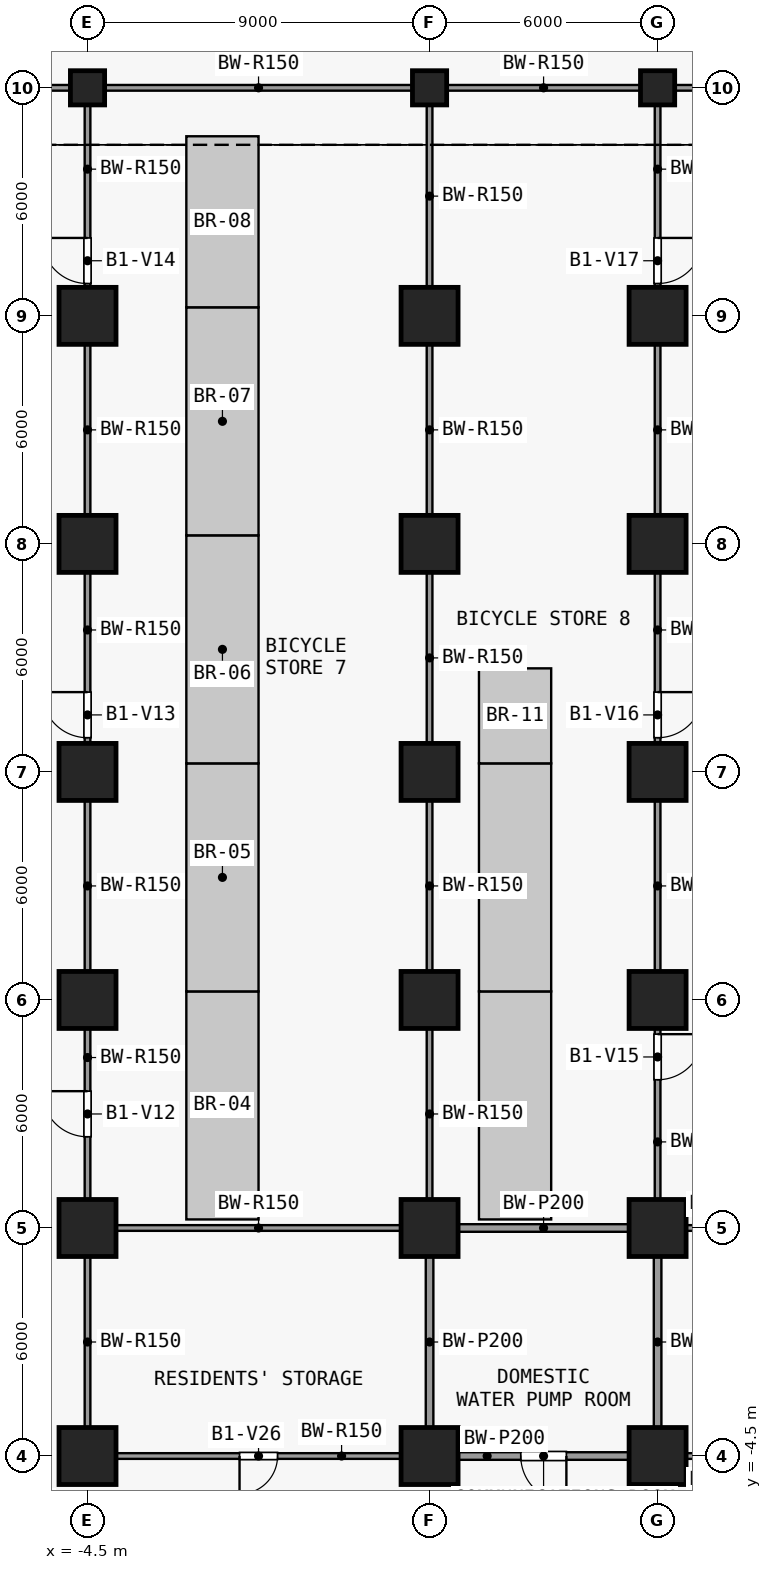
"""IFC4 building model, lengths in metres.
Left out: names, types, materials, properties, quantities, classifications, styles, units other than length and angle.
Written with IfcOpenShell. Run it as: python <this file> out.ifc"""

import sys

from ifc_helpers import new_model, si_unit, direction, frame, frame_2d, origin, origin_2d, place, context, subcontext, project, spatial, rectangle, extrude, element, fill, save


model = new_model("IFC4")
c1 = context("Model", 3, precision=1e-05, world=origin(), true_north=direction((0.0, 1.0)))
c2 = subcontext(c1, "Body", "Model", "MODEL_VIEW")
j1 = project(units=[si_unit("LENGTHUNIT", "METRE"), si_unit("PLANEANGLEUNIT", "RADIAN")], contexts=[c1])
p1 = place(None, origin())
s1 = spatial("IfcSite", under=j1, at=p1, CompositionType="ELEMENT")
p2 = place(p1, origin())
s2 = spatial("IfcBuilding", under=s1, at=p2, CompositionType="ELEMENT")
p3 = place(p2, frame((0.0, 0.0, -5.0)))
s3 = spatial("IfcBuildingStorey", under=s2, at=p3, CompositionType="ELEMENT", Elevation=-5.0)
for number, where, z_axis, x_axis in (
    (1, (-4.5, -4.5, 0.0), (0.0, 0.0, 1.0), (1.0, 0.0, 0.0)),
    (2, (-4.5, 1.5, 0.0), (0.0, 0.0, 1.0), (1.0, 0.0, 0.0)),
    (3, (-4.5, 7.5, 0.0), (0.0, 0.0, 1.0), (1.0, 0.0, 0.0)),
    (4, (-4.5, 13.5, 0.0), (0.0, 0.0, 1.0), (1.0, 0.0, 0.0)),
    (5, (-4.5, 19.5, 0.0), (0.0, 0.0, 1.0), (1.0, 0.0, 0.0)),
    (6, (-4.5, 25.5, 0.0), (0.0, 0.0, 1.0), (1.0, 0.0, 0.0)),
):
    element("IfcColumn", number, at=place(p3, frame(where, z_axis=z_axis, x_axis=x_axis)), inside=s3, PredefinedType="COLUMN", context=c2, shape_type="SweptSolid", body=[
        extrude(rectangle(XDim=1.5, YDim=1.5, at=origin_2d()), origin(), (0.0, 0.0, 1.0), 5.0),
    ])
p4 = place(p3, frame((-4.5, 31.5, 0.0), z_axis=(0.0, 0.0, 1.0), x_axis=(1.0, 0.0, 0.0)))
e7 = element("IfcColumn", 7, at=p4, inside=s3, PredefinedType="COLUMN", context=c2, shape_type="SweptSolid", body=[
    extrude(rectangle(XDim=0.9, YDim=0.9, at=origin_2d()), origin(), (0.0, 0.0, 1.0), 5.0),
])
for number, where, z_axis, x_axis in (
    (8, (4.5, -4.5, 0.0), (0.0, 0.0, 1.0), (1.0, 0.0, 0.0)),
    (9, (4.5, 1.5, 0.0), (0.0, 0.0, 1.0), (1.0, 0.0, 0.0)),
    (10, (4.5, 7.5, 0.0), (0.0, 0.0, 1.0), (1.0, 0.0, 0.0)),
    (11, (4.5, 13.5, 0.0), (0.0, 0.0, 1.0), (1.0, 0.0, 0.0)),
    (12, (4.5, 19.5, 0.0), (0.0, 0.0, 1.0), (1.0, 0.0, 0.0)),
    (13, (4.5, 25.5, 0.0), (0.0, 0.0, 1.0), (1.0, 0.0, 0.0)),
):
    element("IfcColumn", number, at=place(p3, frame(where, z_axis=z_axis, x_axis=x_axis)), inside=s3, PredefinedType="COLUMN", context=c2, shape_type="SweptSolid", body=[
        extrude(rectangle(XDim=1.5, YDim=1.5, at=origin_2d()), origin(), (0.0, 0.0, 1.0), 5.0),
    ])
p5 = place(p3, frame((4.5, 31.5, 0.0), z_axis=(0.0, 0.0, 1.0), x_axis=(1.0, 0.0, 0.0)))
e14 = element("IfcColumn", 14, at=p5, inside=s3, PredefinedType="COLUMN", context=c2, shape_type="SweptSolid", body=[
    extrude(rectangle(XDim=0.9, YDim=0.9, at=origin_2d()), origin(), (0.0, 0.0, 1.0), 5.0),
])
for number, where, z_axis, x_axis in (
    (15, (10.5, -4.5, 0.0), (0.0, 0.0, 1.0), (1.0, 0.0, 0.0)),
    (16, (10.5, 1.5, 0.0), (0.0, 0.0, 1.0), (1.0, 0.0, 0.0)),
    (17, (10.5, 7.5, 0.0), (0.0, 0.0, 1.0), (1.0, 0.0, 0.0)),
    (18, (10.5, 13.5, 0.0), (0.0, 0.0, 1.0), (1.0, 0.0, 0.0)),
    (19, (10.5, 19.5, 0.0), (0.0, 0.0, 1.0), (1.0, 0.0, 0.0)),
    (20, (10.5, 25.5, 0.0), (0.0, 0.0, 1.0), (1.0, 0.0, 0.0)),
):
    element("IfcColumn", number, at=place(p3, frame(where, z_axis=z_axis, x_axis=x_axis)), inside=s3, PredefinedType="COLUMN", context=c2, shape_type="SweptSolid", body=[
        extrude(rectangle(XDim=1.5, YDim=1.5, at=origin_2d()), origin(), (0.0, 0.0, 1.0), 5.0),
    ])
p6 = place(p3, frame((10.5, 31.5, 0.0), z_axis=(0.0, 0.0, 1.0), x_axis=(1.0, 0.0, 0.0)))
e21 = element("IfcColumn", 21, at=p6, inside=s3, PredefinedType="COLUMN", context=c2, shape_type="SweptSolid", body=[
    extrude(rectangle(XDim=0.9, YDim=0.9, at=origin_2d()), origin(), (0.0, 0.0, 1.0), 5.0),
])
p7 = place(p3, frame((3.75, -4.5, 0.0), z_axis=(0.0, 0.0, 1.0), x_axis=(-1.0, 0.0, 0.0)))
e22 = element("IfcWall", 22, at=p7, inside=s3, PredefinedType="PARTITIONING", context=c2, shape_type="SweptSolid", body=[
    extrude(rectangle(XDim=7.5, YDim=0.15, at=frame_2d((3.75, 0.0))), origin(), (0.0, 0.0, 1.0), 4.55),
])
p8 = place(p7, frame((3.25, 0.0, 0.0)))
e23 = element("IfcOpeningElement", 23, at=p8, cuts=e22, PredefinedType="OPENING", context=c2, shape_type="SweptSolid", body=[
    extrude(rectangle(XDim=1.0, YDim=2.1, at=frame_2d((0.5, 1.05))), frame((0.0, 0.085, 0.0), z_axis=(0.0, -1.0, 0.0), x_axis=(1.0, 0.0, 0.0)), (0.0, 0.0, 1.0), 0.17),
])
p9 = place(p3, frame((9.75, -4.5, 0.0), z_axis=(0.0, 0.0, 1.0), x_axis=(-1.0, 0.0, 0.0)))
e24 = element("IfcWall", 24, at=p9, inside=s3, PredefinedType="SOLIDWALL", context=c2, shape_type="SweptSolid", body=[
    extrude(rectangle(XDim=4.5, YDim=0.2, at=frame_2d((2.25, 0.0))), origin(), (0.0, 0.0, 1.0), 4.55),
])
p10 = place(p9, frame((1.65, 0.0, 0.0)))
e25 = element("IfcOpeningElement", 25, at=p10, cuts=e24, PredefinedType="OPENING", context=c2, shape_type="SweptSolid", body=[
    extrude(rectangle(XDim=1.2, YDim=2.1, at=frame_2d((0.6, 1.05))), frame((0.0, 0.11, 0.0), z_axis=(0.0, -1.0, 0.0), x_axis=(1.0, 0.0, 0.0)), (0.0, 0.0, 1.0), 0.22),
])
p11 = place(p3, frame((11.25, -4.5, 0.0), z_axis=(0.0, 0.0, 1.0), x_axis=(1.0, 0.0, 0.0)))
e26 = element("IfcWall", 26, at=p11, inside=s3, PredefinedType="PARTITIONING", context=c2, shape_type="SweptSolid", body=[
    extrude(rectangle(XDim=2.325, YDim=0.15, at=frame_2d((1.163, 0.0))), origin(), (0.0, 0.0, 1.0), 4.55),
])
p12 = place(p3, frame((-3.75, 1.5, 0.0), z_axis=(0.0, 0.0, 1.0), x_axis=(1.0, 0.0, 0.0)))
e27 = element("IfcWall", 27, at=p12, inside=s3, PredefinedType="PARTITIONING", context=c2, shape_type="SweptSolid", body=[
    extrude(rectangle(XDim=7.5, YDim=0.15, at=frame_2d((3.75, 0.0))), origin(), (0.0, 0.0, 1.0), 4.55),
])
p13 = place(p3, frame((5.25, 1.5, 0.0), z_axis=(0.0, 0.0, 1.0), x_axis=(1.0, 0.0, 0.0)))
e28 = element("IfcWall", 28, at=p13, inside=s3, PredefinedType="SOLIDWALL", context=c2, shape_type="SweptSolid", body=[
    extrude(rectangle(XDim=4.5, YDim=0.2, at=frame_2d((2.25, 0.0))), origin(), (0.0, 0.0, 1.0), 4.55),
])
p14 = place(p3, frame((11.25, 1.5, 0.0), z_axis=(0.0, 0.0, 1.0), x_axis=(1.0, 0.0, 0.0)))
e29 = element("IfcWall", 29, at=p14, inside=s3, PredefinedType="PARTITIONING", context=c2, shape_type="SweptSolid", body=[
    extrude(rectangle(XDim=2.325, YDim=0.15, at=frame_2d((1.163, 0.0))), origin(), (0.0, 0.0, 1.0), 4.55),
])
p15 = place(p3, frame((-10.05, 31.5, 0.0), z_axis=(0.0, 0.0, 1.0), x_axis=(1.0, 0.0, 0.0)))
e30 = element("IfcWall", 30, at=p15, inside=s3, PredefinedType="PARTITIONING", context=c2, shape_type="SweptSolid", body=[
    extrude(rectangle(XDim=5.1, YDim=0.15, at=frame_2d((2.55, 0.0))), origin(), (0.0, 0.0, 1.0), 4.55),
])
p16 = place(p3, frame((-4.05, 31.5, 0.0), z_axis=(0.0, 0.0, 1.0), x_axis=(1.0, 0.0, 0.0)))
e31 = element("IfcWall", 31, at=p16, inside=s3, PredefinedType="PARTITIONING", context=c2, shape_type="SweptSolid", body=[
    extrude(rectangle(XDim=8.1, YDim=0.15, at=frame_2d((4.05, 0.0))), origin(), (0.0, 0.0, 1.0), 4.55),
])
for number, where, z_axis, x_axis in (
    (32, (4.95, 31.5, 0.0), (0.0, 0.0, 1.0), (1.0, 0.0, 0.0)),
    (33, (10.95, 31.5, 0.0), (0.0, 0.0, 1.0), (1.0, 0.0, 0.0)),
):
    element("IfcWall", number, at=place(p3, frame(where, z_axis=z_axis, x_axis=x_axis)), inside=s3, PredefinedType="PARTITIONING", context=c2, shape_type="SweptSolid", body=[
        extrude(rectangle(XDim=5.1, YDim=0.15, at=frame_2d((2.55, 0.0))), origin(), (0.0, 0.0, 1.0), 4.55),
    ])
p17 = place(p3, frame((-4.5, -3.75, 0.0), z_axis=(0.0, 0.0, 1.0), x_axis=(0.0, 1.0, 0.0)))
e34 = element("IfcWall", 34, at=p17, inside=s3, PredefinedType="PARTITIONING", context=c2, shape_type="SweptSolid", body=[
    extrude(rectangle(XDim=4.5, YDim=0.15, at=frame_2d((2.25, 0.0))), origin(), (0.0, 0.0, 1.0), 4.55),
])
p18 = place(p3, frame((-4.5, 2.25, 0.0), z_axis=(0.0, 0.0, 1.0), x_axis=(0.0, 1.0, 0.0)))
e35 = element("IfcWall", 35, at=p18, inside=s3, PredefinedType="PARTITIONING", context=c2, shape_type="SweptSolid", body=[
    extrude(rectangle(XDim=4.5, YDim=0.15, at=frame_2d((2.25, 0.0))), origin(), (0.0, 0.0, 1.0), 4.55),
])
p19 = place(p18, frame((1.65, 0.0, 0.0)))
e36 = element("IfcOpeningElement", 36, at=p19, cuts=e35, PredefinedType="OPENING", context=c2, shape_type="SweptSolid", body=[
    extrude(rectangle(XDim=1.2, YDim=2.1, at=frame_2d((0.6, 1.05))), frame((0.0, 0.085, 0.0), z_axis=(0.0, -1.0, 0.0), x_axis=(1.0, 0.0, 0.0)), (0.0, 0.0, 1.0), 0.17),
])
p20 = place(p3, frame((-4.5, 8.25, 0.0), z_axis=(0.0, 0.0, 1.0), x_axis=(0.0, 1.0, 0.0)))
e37 = element("IfcWall", 37, at=p20, inside=s3, PredefinedType="PARTITIONING", context=c2, shape_type="SweptSolid", body=[
    extrude(rectangle(XDim=4.5, YDim=0.15, at=frame_2d((2.25, 0.0))), origin(), (0.0, 0.0, 1.0), 4.55),
])
p21 = place(p3, frame((-4.5, 14.25, 0.0), z_axis=(0.0, 0.0, 1.0), x_axis=(0.0, 1.0, 0.0)))
e38 = element("IfcWall", 38, at=p21, inside=s3, PredefinedType="PARTITIONING", context=c2, shape_type="SweptSolid", body=[
    extrude(rectangle(XDim=4.5, YDim=0.15, at=frame_2d((2.25, 0.0))), origin(), (0.0, 0.0, 1.0), 4.55),
])
p22 = place(p21, frame((0.15, 0.0, 0.0)))
e39 = element("IfcOpeningElement", 39, at=p22, cuts=e38, PredefinedType="OPENING", context=c2, shape_type="SweptSolid", body=[
    extrude(rectangle(XDim=1.2, YDim=2.1, at=frame_2d((0.6, 1.05))), frame((0.0, 0.085, 0.0), z_axis=(0.0, -1.0, 0.0), x_axis=(1.0, 0.0, 0.0)), (0.0, 0.0, 1.0), 0.17),
])
p23 = place(p3, frame((-4.5, 20.25, 0.0), z_axis=(0.0, 0.0, 1.0), x_axis=(0.0, 1.0, 0.0)))
e40 = element("IfcWall", 40, at=p23, inside=s3, PredefinedType="PARTITIONING", context=c2, shape_type="SweptSolid", body=[
    extrude(rectangle(XDim=4.5, YDim=0.15, at=frame_2d((2.25, 0.0))), origin(), (0.0, 0.0, 1.0), 4.55),
])
p24 = place(p3, frame((-4.5, 26.25, 0.0), z_axis=(0.0, 0.0, 1.0), x_axis=(0.0, 1.0, 0.0)))
e41 = element("IfcWall", 41, at=p24, inside=s3, PredefinedType="PARTITIONING", context=c2, shape_type="SweptSolid", body=[
    extrude(rectangle(XDim=4.8, YDim=0.15, at=frame_2d((2.4, 0.0))), origin(), (0.0, 0.0, 1.0), 4.55),
])
p25 = place(p24, frame((0.1, 0.0, 0.0)))
e42 = element("IfcOpeningElement", 42, at=p25, cuts=e41, PredefinedType="OPENING", context=c2, shape_type="SweptSolid", body=[
    extrude(rectangle(XDim=1.2, YDim=2.1, at=frame_2d((0.6, 1.05))), frame((0.0, 0.085, 0.0), z_axis=(0.0, -1.0, 0.0), x_axis=(1.0, 0.0, 0.0)), (0.0, 0.0, 1.0), 0.17),
])
p26 = place(p3, frame((4.5, -3.75, 0.0), z_axis=(0.0, 0.0, 1.0), x_axis=(0.0, 1.0, 0.0)))
e43 = element("IfcWall", 43, at=p26, inside=s3, PredefinedType="SOLIDWALL", context=c2, shape_type="SweptSolid", body=[
    extrude(rectangle(XDim=4.5, YDim=0.2, at=frame_2d((2.25, 0.0))), origin(), (0.0, 0.0, 1.0), 4.55),
])
for number, where, z_axis, x_axis in (
    (44, (4.5, 2.25, 0.0), (0.0, 0.0, 1.0), (0.0, 1.0, 0.0)),
    (45, (4.5, 8.25, 0.0), (0.0, 0.0, 1.0), (0.0, 1.0, 0.0)),
    (46, (4.5, 14.25, 0.0), (0.0, 0.0, 1.0), (0.0, 1.0, 0.0)),
    (47, (4.5, 20.25, 0.0), (0.0, 0.0, 1.0), (0.0, 1.0, 0.0)),
):
    element("IfcWall", number, at=place(p3, frame(where, z_axis=z_axis, x_axis=x_axis)), inside=s3, PredefinedType="PARTITIONING", context=c2, shape_type="SweptSolid", body=[
        extrude(rectangle(XDim=4.5, YDim=0.15, at=frame_2d((2.25, 0.0))), origin(), (0.0, 0.0, 1.0), 4.55),
    ])
p27 = place(p3, frame((4.5, 26.25, 0.0), z_axis=(0.0, 0.0, 1.0), x_axis=(0.0, 1.0, 0.0)))
e48 = element("IfcWall", 48, at=p27, inside=s3, PredefinedType="PARTITIONING", context=c2, shape_type="SweptSolid", body=[
    extrude(rectangle(XDim=4.8, YDim=0.15, at=frame_2d((2.4, 0.0))), origin(), (0.0, 0.0, 1.0), 4.55),
])
p28 = place(p3, frame((10.5, -3.75, 0.0), z_axis=(0.0, 0.0, 1.0), x_axis=(0.0, 1.0, 0.0)))
e49 = element("IfcWall", 49, at=p28, inside=s3, PredefinedType="SOLIDWALL", context=c2, shape_type="SweptSolid", body=[
    extrude(rectangle(XDim=4.5, YDim=0.2, at=frame_2d((2.25, 0.0))), origin(), (0.0, 0.0, 1.0), 4.55),
])
p29 = place(p3, frame((10.5, 6.75, 0.0), z_axis=(0.0, 0.0, 1.0), x_axis=(0.0, -1.0, 0.0)))
e50 = element("IfcWall", 50, at=p29, inside=s3, PredefinedType="PARTITIONING", context=c2, shape_type="SweptSolid", body=[
    extrude(rectangle(XDim=4.5, YDim=0.15, at=frame_2d((2.25, 0.0))), origin(), (0.0, 0.0, 1.0), 4.55),
])
p30 = place(p29, frame((0.15, 0.0, 0.0)))
e51 = element("IfcOpeningElement", 51, at=p30, cuts=e50, PredefinedType="OPENING", context=c2, shape_type="SweptSolid", body=[
    extrude(rectangle(XDim=1.2, YDim=2.1, at=frame_2d((0.6, 1.05))), frame((0.0, 0.085, 0.0), z_axis=(0.0, -1.0, 0.0), x_axis=(1.0, 0.0, 0.0)), (0.0, 0.0, 1.0), 0.17),
])
p31 = place(p3, frame((10.5, 8.25, 0.0), z_axis=(0.0, 0.0, 1.0), x_axis=(0.0, 1.0, 0.0)))
e52 = element("IfcWall", 52, at=p31, inside=s3, PredefinedType="PARTITIONING", context=c2, shape_type="SweptSolid", body=[
    extrude(rectangle(XDim=4.5, YDim=0.15, at=frame_2d((2.25, 0.0))), origin(), (0.0, 0.0, 1.0), 4.55),
])
p32 = place(p3, frame((10.5, 18.75, 0.0), z_axis=(0.0, 0.0, 1.0), x_axis=(0.0, -1.0, 0.0)))
e53 = element("IfcWall", 53, at=p32, inside=s3, PredefinedType="PARTITIONING", context=c2, shape_type="SweptSolid", body=[
    extrude(rectangle(XDim=4.5, YDim=0.15, at=frame_2d((2.25, 0.0))), origin(), (0.0, 0.0, 1.0), 4.55),
])
p33 = place(p32, frame((3.15, 0.0, 0.0)))
e54 = element("IfcOpeningElement", 54, at=p33, cuts=e53, PredefinedType="OPENING", context=c2, shape_type="SweptSolid", body=[
    extrude(rectangle(XDim=1.2, YDim=2.1, at=frame_2d((0.6, 1.05))), frame((0.0, 0.085, 0.0), z_axis=(0.0, -1.0, 0.0), x_axis=(1.0, 0.0, 0.0)), (0.0, 0.0, 1.0), 0.17),
])
p34 = place(p3, frame((10.5, 20.25, 0.0), z_axis=(0.0, 0.0, 1.0), x_axis=(0.0, 1.0, 0.0)))
e55 = element("IfcWall", 55, at=p34, inside=s3, PredefinedType="PARTITIONING", context=c2, shape_type="SweptSolid", body=[
    extrude(rectangle(XDim=4.5, YDim=0.15, at=frame_2d((2.25, 0.0))), origin(), (0.0, 0.0, 1.0), 4.55),
])
p35 = place(p3, frame((10.5, 31.05, 0.0), z_axis=(0.0, 0.0, 1.0), x_axis=(0.0, -1.0, 0.0)))
e56 = element("IfcWall", 56, at=p35, inside=s3, PredefinedType="PARTITIONING", context=c2, shape_type="SweptSolid", body=[
    extrude(rectangle(XDim=4.8, YDim=0.15, at=frame_2d((2.4, 0.0))), origin(), (0.0, 0.0, 1.0), 4.55),
])
p36 = place(p35, frame((3.5, 0.0, 0.0)))
e57 = element("IfcOpeningElement", 57, at=p36, cuts=e56, PredefinedType="OPENING", context=c2, shape_type="SweptSolid", body=[
    extrude(rectangle(XDim=1.2, YDim=2.1, at=frame_2d((0.6, 1.05))), frame((0.0, 0.085, 0.0), z_axis=(0.0, -1.0, 0.0), x_axis=(1.0, 0.0, 0.0)), (0.0, 0.0, 1.0), 0.17),
])
p37 = place(p19, origin())
e58 = element("IfcDoor", 58, at=p37, inside=s3, OperationType="SINGLE_SWING_RIGHT", PredefinedType="DOOR", context=c2, shape_type="SweptSolid", body=[
    extrude(rectangle(XDim=1.2, YDim=2.1, at=frame_2d((0.6, 1.05))), frame((0.0, 0.025, 0.0), z_axis=(0.0, -1.0, 0.0), x_axis=(1.0, 0.0, 0.0)), (0.0, 0.0, 1.0), 0.05),
])
fill(e36, e58)
p38 = place(p22, origin())
e59 = element("IfcDoor", 59, at=p38, inside=s3, OperationType="SINGLE_SWING_RIGHT", PredefinedType="DOOR", context=c2, shape_type="SweptSolid", body=[
    extrude(rectangle(XDim=1.2, YDim=2.1, at=frame_2d((0.6, 1.05))), frame((0.0, 0.025, 0.0), z_axis=(0.0, -1.0, 0.0), x_axis=(1.0, 0.0, 0.0)), (0.0, 0.0, 1.0), 0.05),
])
fill(e39, e59)
p39 = place(p25, origin())
e60 = element("IfcDoor", 60, at=p39, inside=s3, OperationType="SINGLE_SWING_RIGHT", PredefinedType="DOOR", context=c2, shape_type="SweptSolid", body=[
    extrude(rectangle(XDim=1.2, YDim=2.1, at=frame_2d((0.6, 1.05))), frame((0.0, 0.025, 0.0), z_axis=(0.0, -1.0, 0.0), x_axis=(1.0, 0.0, 0.0)), (0.0, 0.0, 1.0), 0.05),
])
fill(e42, e60)
p40 = place(p30, origin())
e61 = element("IfcDoor", 61, at=p40, inside=s3, OperationType="SINGLE_SWING_LEFT", PredefinedType="DOOR", context=c2, shape_type="SweptSolid", body=[
    extrude(rectangle(XDim=1.2, YDim=2.1, at=frame_2d((0.6, 1.05))), frame((0.0, 0.025, 0.0), z_axis=(0.0, -1.0, 0.0), x_axis=(1.0, 0.0, 0.0)), (0.0, 0.0, 1.0), 0.05),
])
fill(e51, e61)
p41 = place(p33, origin())
e62 = element("IfcDoor", 62, at=p41, inside=s3, OperationType="SINGLE_SWING_LEFT", PredefinedType="DOOR", context=c2, shape_type="SweptSolid", body=[
    extrude(rectangle(XDim=1.2, YDim=2.1, at=frame_2d((0.6, 1.05))), frame((0.0, 0.025, 0.0), z_axis=(0.0, -1.0, 0.0), x_axis=(1.0, 0.0, 0.0)), (0.0, 0.0, 1.0), 0.05),
])
fill(e54, e62)
p42 = place(p36, origin())
e63 = element("IfcDoor", 63, at=p42, inside=s3, OperationType="SINGLE_SWING_LEFT", PredefinedType="DOOR", context=c2, shape_type="SweptSolid", body=[
    extrude(rectangle(XDim=1.2, YDim=2.1, at=frame_2d((0.6, 1.05))), frame((0.0, 0.025, 0.0), z_axis=(0.0, -1.0, 0.0), x_axis=(1.0, 0.0, 0.0)), (0.0, 0.0, 1.0), 0.05),
])
fill(e57, e63)
p43 = place(p8, origin())
e64 = element("IfcDoor", 64, at=p43, inside=s3, OperationType="SINGLE_SWING_RIGHT", PredefinedType="DOOR", context=c2, shape_type="SweptSolid", body=[
    extrude(rectangle(XDim=1.0, YDim=2.1, at=frame_2d((0.5, 1.05))), frame((0.0, 0.025, 0.0), z_axis=(0.0, -1.0, 0.0), x_axis=(1.0, 0.0, 0.0)), (0.0, 0.0, 1.0), 0.05),
])
fill(e23, e64)
p44 = place(p10, origin())
e65 = element("IfcDoor", 65, at=p44, inside=s3, OperationType="SINGLE_SWING_LEFT", PredefinedType="DOOR", context=c2, shape_type="SweptSolid", body=[
    extrude(rectangle(XDim=1.2, YDim=2.1, at=frame_2d((0.6, 1.05))), frame((0.0, 0.025, 0.0), z_axis=(0.0, -1.0, 0.0), x_axis=(1.0, 0.0, 0.0)), (0.0, 0.0, 1.0), 0.05),
])
fill(e25, e65)
save(model, sys.argv[1])
